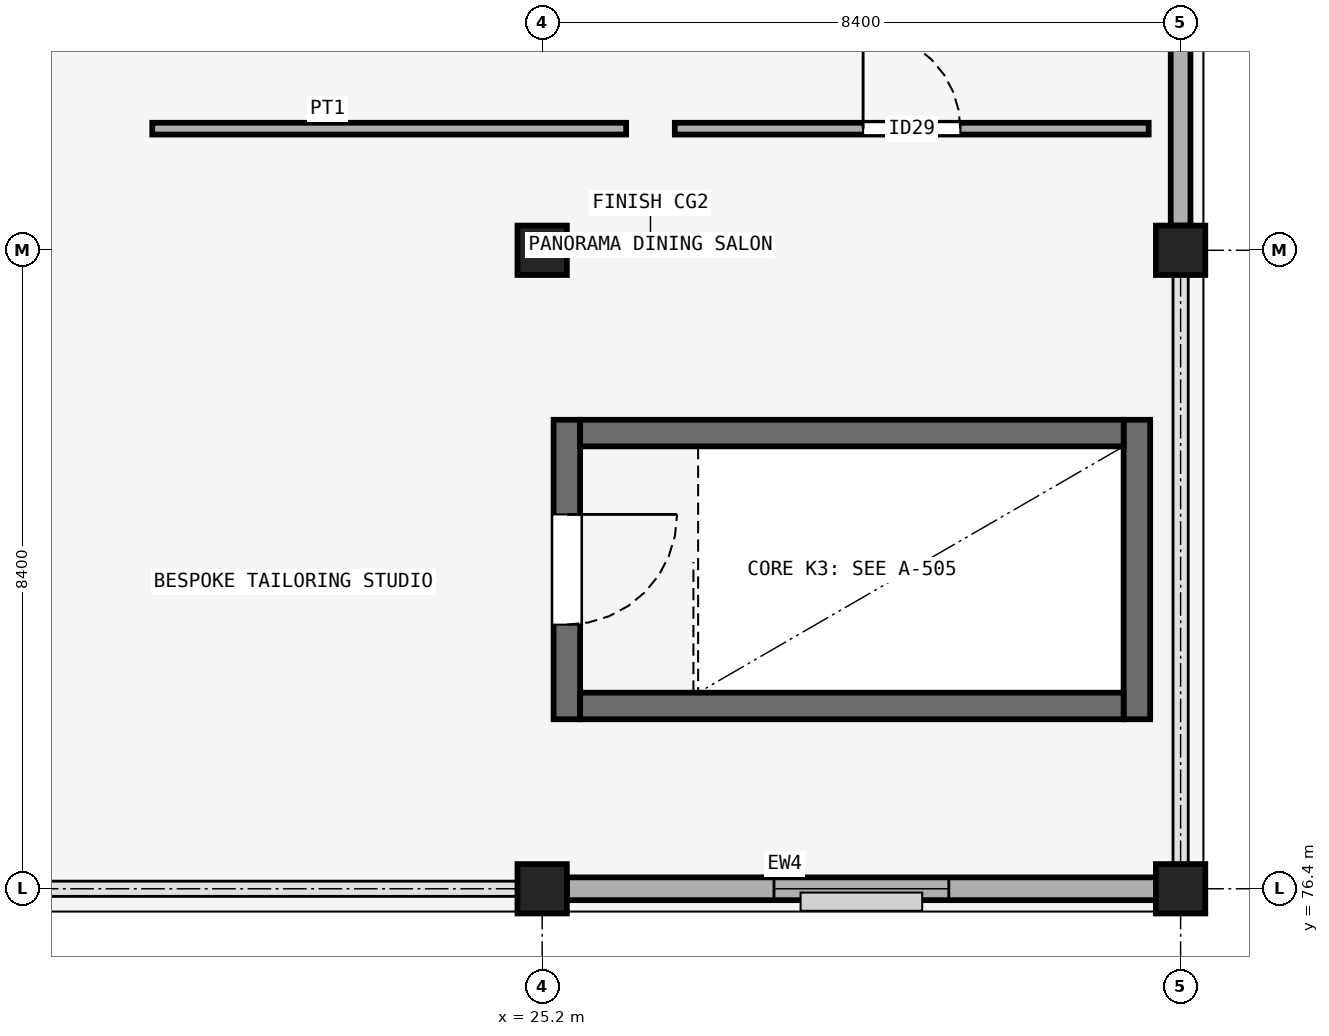
"""IFC4 building model, lengths in metres.
Left out: names, types, materials, properties, quantities, classifications, styles, units other than length and angle.
Written with IfcOpenShell. Run it as: python <this file> out.ifc"""

import sys

from ifc_helpers import new_model, si_unit, direction, frame, frame_2d, origin, origin_2d, place, context, subcontext, project, spatial, rectangle, extrude, element, fill, save


model = new_model("IFC4")
c1 = context("Model", 3, precision=1e-05, world=origin(), true_north=direction((0.0, 1.0)))
c2 = subcontext(c1, "Body", "Model", "MODEL_VIEW")
j1 = project(units=[si_unit("LENGTHUNIT", "METRE"), si_unit("PLANEANGLEUNIT", "RADIAN")], contexts=[c1])
p1 = place(None, origin())
s1 = spatial("IfcSite", under=j1, at=p1, CompositionType="ELEMENT")
p2 = place(p1, origin())
s2 = spatial("IfcBuilding", under=s1, at=p2, CompositionType="ELEMENT")
p3 = place(p2, frame((0.0, 0.0, 32.4)))
s3 = spatial("IfcBuildingStorey", under=s2, at=p3, CompositionType="ELEMENT", Elevation=32.4)
for number, where, z_axis, x_axis in (
    (1, (25.2, 76.4, 0.0), (0.0, 0.0, 1.0), (1.0, 0.0, 0.0)),
    (2, (33.6, 76.4, 0.0), (0.0, 0.0, 1.0), (1.0, 0.0, 0.0)),
    (3, (25.2, 84.8, 0.0), (0.0, 0.0, 1.0), (1.0, 0.0, 0.0)),
    (4, (33.6, 84.8, 0.0), (0.0, 0.0, 1.0), (1.0, 0.0, 0.0)),
):
    element("IfcColumn", number, at=place(p3, frame(where, z_axis=z_axis, x_axis=x_axis)), inside=s3, PredefinedType="COLUMN", context=c2, shape_type="SweptSolid", body=[
        extrude(rectangle(XDim=0.65, YDim=0.65, at=origin_2d()), origin(), (0.0, 0.0, 1.0), 4.5),
    ])
p4 = place(p3, frame((25.525, 76.4, 0.0), z_axis=(0.0, 0.0, 1.0), x_axis=(1.0, 0.0, 0.0)))
e5 = element("IfcWall", 5, at=p4, inside=s3, PredefinedType="SOLIDWALL", context=c2, shape_type="SweptSolid", body=[
    extrude(rectangle(XDim=7.75, YDim=0.3, at=frame_2d((3.875, 0.0))), origin(), (0.0, 0.0, 1.0), 3.49),
])
p5 = place(p4, frame((2.725, 0.0, 0.95)))
e6 = element("IfcOpeningElement", 6, at=p5, cuts=e5, PredefinedType="OPENING", context=c2, shape_type="SweptSolid", body=[
    extrude(rectangle(XDim=2.3, YDim=1.6, at=frame_2d((1.15, 0.8))), frame((0.0, 0.16, 0.0), z_axis=(0.0, -1.0, 0.0), x_axis=(1.0, 0.0, 0.0)), (0.0, 0.0, 1.0), 0.32),
])
p6 = place(p3, frame((33.6, 85.125, 0.0), z_axis=(0.0, 0.0, 1.0), x_axis=(0.0, 1.0, 0.0)))
e7 = element("IfcWall", 7, at=p6, inside=s3, PredefinedType="SOLIDWALL", context=c2, shape_type="SweptSolid", body=[
    extrude(rectangle(XDim=7.75, YDim=0.26, at=frame_2d((3.875, 0.0))), origin(), (0.0, 0.0, 1.0), 3.49),
])
p7 = place(p6, frame((2.65, 0.0, 0.95)))
e8 = element("IfcOpeningElement", 8, at=p7, cuts=e7, PredefinedType="OPENING", context=c2, shape_type="SweptSolid", body=[
    extrude(rectangle(XDim=2.45, YDim=1.85, at=frame_2d((1.225, 0.925))), frame((0.0, 0.14, 0.0), z_axis=(0.0, -1.0, 0.0), x_axis=(1.0, 0.0, 0.0)), (0.0, 0.0, 1.0), 0.28),
])
p8 = place(p3, frame((25.525, 82.57, 0.0), z_axis=(0.0, 0.0, 1.0), x_axis=(0.0, -1.0, 0.0)))
e9 = element("IfcWall", 9, at=p8, inside=s3, PredefinedType="SHEAR", context=c2, shape_type="SweptSolid", body=[
    extrude(rectangle(XDim=3.94, YDim=0.35, at=frame_2d((1.97, 0.0))), origin(), (0.0, 0.0, 1.0), 4.24),
])
p9 = place(p8, frame((1.245, 0.0, 0.0)))
e10 = element("IfcOpeningElement", 10, at=p9, cuts=e9, PredefinedType="OPENING", context=c2, shape_type="SweptSolid", body=[
    extrude(rectangle(XDim=1.45, YDim=2.2, at=frame_2d((0.725, 1.1))), frame((0.0, 0.185, 0.0), z_axis=(0.0, -1.0, 0.0), x_axis=(1.0, 0.0, 0.0)), (0.0, 0.0, 1.0), 0.37),
])
p10 = place(p3, frame((33.025, 78.63, 0.0), z_axis=(0.0, 0.0, 1.0), x_axis=(0.0, 1.0, 0.0)))
e11 = element("IfcWall", 11, at=p10, inside=s3, PredefinedType="SHEAR", context=c2, shape_type="SweptSolid", body=[
    extrude(rectangle(XDim=3.94, YDim=0.35, at=frame_2d((1.97, 0.0))), origin(), (0.0, 0.0, 1.0), 4.24),
])
for number, where, z_axis, x_axis in (
    (12, (25.7, 78.805, 0.0), (0.0, 0.0, 1.0), (1.0, 0.0, 0.0)),
    (13, (25.7, 82.395, 0.0), (0.0, 0.0, 1.0), (1.0, 0.0, 0.0)),
):
    element("IfcWall", number, at=place(p3, frame(where, z_axis=z_axis, x_axis=x_axis)), inside=s3, PredefinedType="SHEAR", context=c2, shape_type="SweptSolid", body=[
        extrude(rectangle(XDim=7.15, YDim=0.35, at=frame_2d((3.575, 0.0))), origin(), (0.0, 0.0, 1.0), 4.24),
    ])
p11 = place(p3, frame((20.07, 86.4, 0.0), z_axis=(0.0, 0.0, 1.0), x_axis=(1.0, 0.0, 0.0)))
e14 = element("IfcWall", 14, at=p11, inside=s3, PredefinedType="PARTITIONING", context=c2, shape_type="SweptSolid", body=[
    extrude(rectangle(XDim=6.235, YDim=0.155, at=frame_2d((3.117, 0.0))), origin(), (0.0, 0.0, 1.0), 3.54),
])
p12 = place(p3, frame((26.945, 86.4, 0.0), z_axis=(0.0, 0.0, 1.0), x_axis=(1.0, 0.0, 0.0)))
e15 = element("IfcWall", 15, at=p12, inside=s3, PredefinedType="PARTITIONING", context=c2, shape_type="SweptSolid", body=[
    extrude(rectangle(XDim=6.235, YDim=0.155, at=frame_2d((3.117, 0.0))), origin(), (0.0, 0.0, 1.0), 4.24),
])
p13 = place(p12, frame((2.478, 0.0, 0.0)))
e16 = element("IfcOpeningElement", 16, at=p13, cuts=e15, PredefinedType="OPENING", context=c2, shape_type="SweptSolid", body=[
    extrude(rectangle(XDim=1.28, YDim=2.34, at=frame_2d((0.64, 1.17))), frame((0.0, 0.087, 0.0), z_axis=(0.0, -1.0, 0.0), x_axis=(1.0, 0.0, 0.0)), (0.0, 0.0, 1.0), 0.175),
])
p14 = place(p5, origin())
e17 = element("IfcWindow", 17, at=p14, inside=s3, PartitioningType="DOUBLE_PANEL_VERTICAL", PredefinedType="WINDOW", context=c2, shape_type="SweptSolid", body=[
    extrude(rectangle(XDim=2.3, YDim=1.6, at=frame_2d((1.15, 0.8))), frame((0.0, 0.03, 0.0), z_axis=(0.0, -1.0, 0.0), x_axis=(1.0, 0.0, 0.0)), (0.0, 0.0, 1.0), 0.06),
])
fill(e6, e17)
p15 = place(p9, origin())
e18 = element("IfcDoor", 18, at=p15, inside=s3, OperationType="SINGLE_SWING_LEFT", PredefinedType="DOOR", context=c2, shape_type="SweptSolid", body=[
    extrude(rectangle(XDim=1.45, YDim=2.2, at=frame_2d((0.725, 1.1))), frame((0.0, 0.025, 0.0), z_axis=(0.0, -1.0, 0.0), x_axis=(1.0, 0.0, 0.0)), (0.0, 0.0, 1.0), 0.05),
])
fill(e10, e18)
p16 = place(p13, origin())
e19 = element("IfcDoor", 19, at=p16, inside=s3, OperationType="SINGLE_SWING_LEFT", PredefinedType="DOOR", context=c2, shape_type="SweptSolid", body=[
    extrude(rectangle(XDim=1.28, YDim=2.34, at=frame_2d((0.64, 1.17))), frame((0.0, 0.025, 0.0), z_axis=(0.0, -1.0, 0.0), x_axis=(1.0, 0.0, 0.0)), (0.0, 0.0, 1.0), 0.05),
])
fill(e16, e19)
save(model, sys.argv[1])
